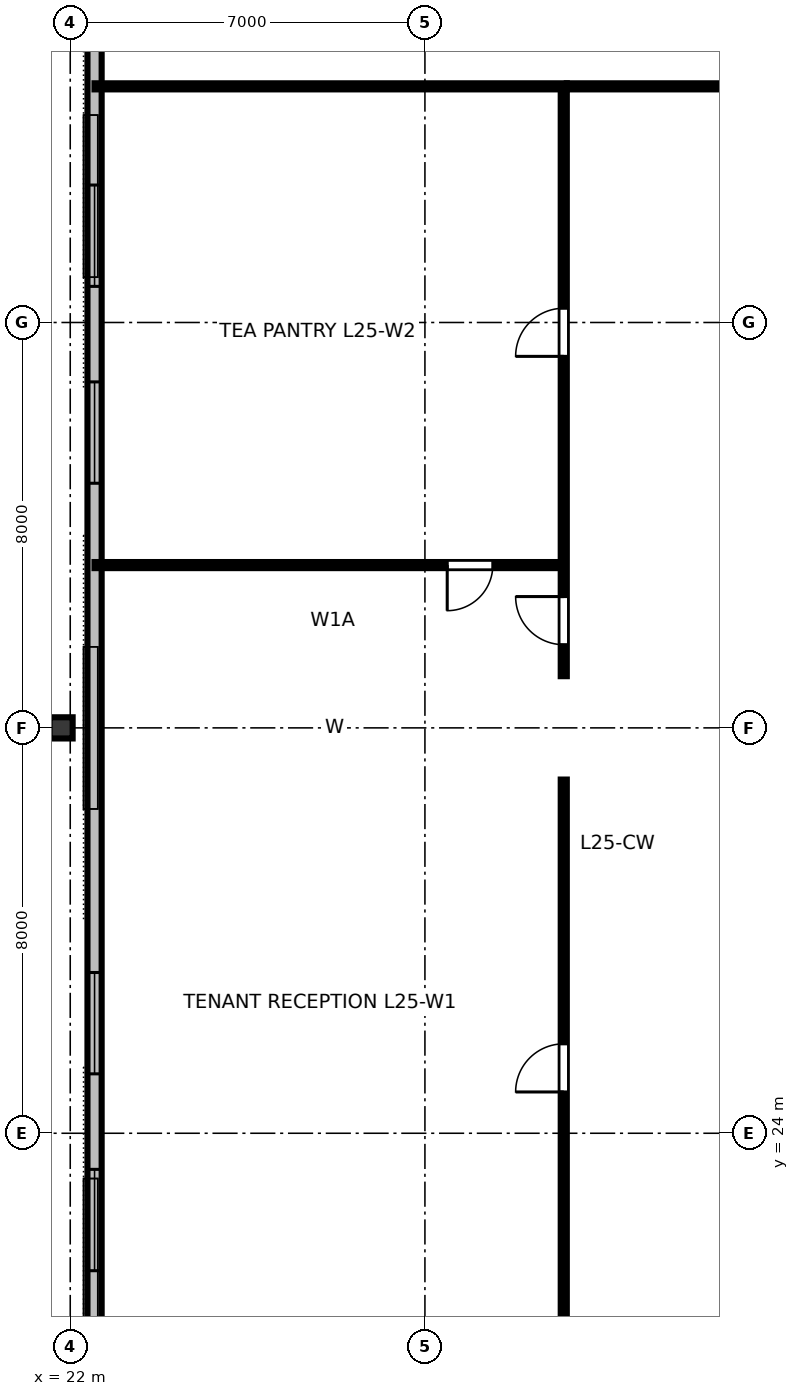
"""IFC4 building model, lengths in metres.
Left out: names, types, materials, properties, quantities, classifications, styles, units other than length and angle.
Written with IfcOpenShell. Run it as: python <this file> out.ifc"""

import sys

from ifc_helpers import new_model, si_unit, direction, frame, frame_2d, origin, origin_2d, place, context, subcontext, project, spatial, rectangle, i_section, extrude, element, fill, save


model = new_model("IFC4")
c1 = context("Model", 3, precision=1e-05, world=origin(), true_north=direction((0.0, 1.0)))
c2 = subcontext(c1, "Body", "Model", "MODEL_VIEW")
j1 = project(units=[si_unit("LENGTHUNIT", "METRE"), si_unit("PLANEANGLEUNIT", "RADIAN")], contexts=[c1])
p1 = place(None, origin())
s1 = spatial("IfcSite", under=j1, at=p1, CompositionType="ELEMENT")
p2 = place(p1, origin())
s2 = spatial("IfcBuilding", under=s1, at=p2, CompositionType="ELEMENT")
p3 = place(p2, frame((0.0, 0.0, 98.8)))
s3 = spatial("IfcBuildingStorey", under=s2, at=p3, CompositionType="ELEMENT", Elevation=98.8)
p4 = place(p3, frame((21.82, 32.0, 0.0), z_axis=(0.0, 0.0, 1.0), x_axis=(0.0, 1.0, 0.0)))
e1 = element("IfcColumn", 1, at=p4, inside=s3, PredefinedType="COLUMN", context=c2, shape_type="SweptSolid", body=[
    extrude(i_section(OverallWidth=0.418, OverallDepth=0.455, WebThickness=0.042, FlangeThickness=0.068, FilletRadius=0.025, at=origin_2d()), origin(), (0.0, 0.0, 1.0), 3.358),
])
p5 = place(p3, frame((22.48, 48.64, 0.0), z_axis=(0.0, 0.0, 1.0), x_axis=(0.0, -1.0, 0.0)))
e2 = element("IfcWall", 2, at=p5, inside=s3, PredefinedType="STANDARD", context=c2, shape_type="SweptSolid", body=[
    extrude(rectangle(XDim=33.28, YDim=0.28, at=frame_2d((16.64, 0.0))), origin(), (0.0, 0.0, 1.0), 3.36),
])
p6 = place(p5, frame((5.927, 0.0, 0.8)))
e3 = element("IfcOpeningElement", 3, at=p6, cuts=e2, PredefinedType="OPENING", context=c2, shape_type="SweptSolid", body=[
    extrude(rectangle(XDim=2.0, YDim=1.95, at=frame_2d((1.0, 0.975))), frame((0.0, 0.15, 0.0), z_axis=(0.0, -1.0, 0.0), x_axis=(1.0, 0.0, 0.0)), (0.0, 0.0, 1.0), 0.3),
])
p7 = place(p5, frame((9.812, 0.0, 0.8)))
e4 = element("IfcOpeningElement", 4, at=p7, cuts=e2, PredefinedType="OPENING", context=c2, shape_type="SweptSolid", body=[
    extrude(rectangle(XDim=2.0, YDim=1.95, at=frame_2d((1.0, 0.975))), frame((0.0, 0.15, 0.0), z_axis=(0.0, -1.0, 0.0), x_axis=(1.0, 0.0, 0.0)), (0.0, 0.0, 1.0), 0.3),
])
p8 = place(p5, frame((21.468, 0.0, 0.8)))
e5 = element("IfcOpeningElement", 5, at=p8, cuts=e2, PredefinedType="OPENING", context=c2, shape_type="SweptSolid", body=[
    extrude(rectangle(XDim=2.0, YDim=1.95, at=frame_2d((1.0, 0.975))), frame((0.0, 0.15, 0.0), z_axis=(0.0, -1.0, 0.0), x_axis=(1.0, 0.0, 0.0)), (0.0, 0.0, 1.0), 0.3),
])
p9 = place(p5, frame((25.353, 0.0, 0.8)))
e6 = element("IfcOpeningElement", 6, at=p9, cuts=e2, PredefinedType="OPENING", context=c2, shape_type="SweptSolid", body=[
    extrude(rectangle(XDim=2.0, YDim=1.95, at=frame_2d((1.0, 0.975))), frame((0.0, 0.15, 0.0), z_axis=(0.0, -1.0, 0.0), x_axis=(1.0, 0.0, 0.0)), (0.0, 0.0, 1.0), 0.3),
])
p10 = place(p3, frame((31.8, 44.66, 0.0), z_axis=(0.0, 0.0, 1.0), x_axis=(1.0, 0.0, 0.0)))
e7 = element("IfcWall", 7, at=p10, inside=s3, PredefinedType="PARTITIONING", context=c2, shape_type="SweptSolid", body=[
    extrude(rectangle(XDim=28.4, YDim=0.12, at=frame_2d((14.2, 0.0))), origin(), (0.0, 0.0, 1.0), 2.64),
])
p11 = place(p10, frame((3.452, 0.0, 0.0)))
e8 = element("IfcOpeningElement", 8, at=p11, cuts=e7, PredefinedType="OPENING", context=c2, shape_type="SweptSolid", body=[
    extrude(rectangle(XDim=0.95, YDim=2.15, at=frame_2d((0.475, 1.075))), frame((0.0, 0.07, 0.0), z_axis=(0.0, -1.0, 0.0), x_axis=(1.0, 0.0, 0.0)), (0.0, 0.0, 1.0), 0.14),
])
p12 = place(p10, frame((12.551, 0.0, 0.0)))
e9 = element("IfcOpeningElement", 9, at=p12, cuts=e7, PredefinedType="OPENING", context=c2, shape_type="SweptSolid", body=[
    extrude(rectangle(XDim=0.95, YDim=2.15, at=frame_2d((0.475, 1.075))), frame((0.0, 0.07, 0.0), z_axis=(0.0, -1.0, 0.0), x_axis=(1.0, 0.0, 0.0)), (0.0, 0.0, 1.0), 0.14),
])
p13 = place(p10, frame((22.823, 0.0, 0.0)))
e10 = element("IfcOpeningElement", 10, at=p13, cuts=e7, PredefinedType="OPENING", context=c2, shape_type="SweptSolid", body=[
    extrude(rectangle(XDim=0.95, YDim=2.15, at=frame_2d((0.475, 1.075))), frame((0.0, 0.07, 0.0), z_axis=(0.0, -1.0, 0.0), x_axis=(1.0, 0.0, 0.0)), (0.0, 0.0, 1.0), 0.14),
])
p14 = place(p3, frame((31.74, 35.213, 0.0), z_axis=(0.0, 0.0, 1.0), x_axis=(-1.0, 0.0, 0.0)))
e11 = element("IfcWall", 11, at=p14, inside=s3, PredefinedType="PARTITIONING", context=c2, shape_type="SweptSolid", body=[
    extrude(rectangle(XDim=9.26, YDim=0.12, at=frame_2d((4.63, 0.0))), origin(), (0.0, 0.0, 1.0), 2.64),
])
p15 = place(p14, frame((1.4, 0.0, 0.0)))
e12 = element("IfcOpeningElement", 12, at=p15, cuts=e11, PredefinedType="OPENING", context=c2, shape_type="SweptSolid", body=[
    extrude(rectangle(XDim=0.9, YDim=2.15, at=frame_2d((0.45, 1.075))), frame((0.0, 0.07, 0.0), z_axis=(0.0, -1.0, 0.0), x_axis=(1.0, 0.0, 0.0)), (0.0, 0.0, 1.0), 0.14),
])
p16 = place(p3, frame((31.74, 19.4, 0.0), z_axis=(0.0, 0.0, 1.0), x_axis=(0.0, 1.0, 0.0)))
e13 = element("IfcWall", 13, at=p16, inside=s3, PredefinedType="PARTITIONING", context=c2, shape_type="SweptSolid", body=[
    extrude(rectangle(XDim=11.58, YDim=0.12, at=frame_2d((5.79, 0.0))), origin(), (0.0, 0.0, 1.0), 2.64),
])
p17 = place(p16, frame((5.415, 0.0, 0.0)))
e14 = element("IfcOpeningElement", 14, at=p17, cuts=e13, PredefinedType="OPENING", context=c2, shape_type="SweptSolid", body=[
    extrude(rectangle(XDim=0.95, YDim=2.15, at=frame_2d((0.475, 1.075))), frame((0.0, 0.07, 0.0), z_axis=(0.0, -1.0, 0.0), x_axis=(1.0, 0.0, 0.0)), (0.0, 0.0, 1.0), 0.14),
])
p18 = place(p3, frame((31.74, 33.02, 0.0), z_axis=(0.0, 0.0, 1.0), x_axis=(0.0, 1.0, 0.0)))
e15 = element("IfcWall", 15, at=p18, inside=s3, PredefinedType="PARTITIONING", context=c2, shape_type="SweptSolid", body=[
    extrude(rectangle(XDim=11.58, YDim=0.12, at=frame_2d((5.79, 0.0))), origin(), (0.0, 0.0, 1.0), 2.64),
])
p19 = place(p18, frame((0.621, 0.0, 0.0)))
e16 = element("IfcOpeningElement", 16, at=p19, cuts=e15, PredefinedType="OPENING", context=c2, shape_type="SweptSolid", body=[
    extrude(rectangle(XDim=0.95, YDim=2.15, at=frame_2d((0.475, 1.075))), frame((0.0, 0.07, 0.0), z_axis=(0.0, -1.0, 0.0), x_axis=(1.0, 0.0, 0.0)), (0.0, 0.0, 1.0), 0.14),
])
p20 = place(p18, frame((6.311, 0.0, 0.0)))
e17 = element("IfcOpeningElement", 17, at=p20, cuts=e15, PredefinedType="OPENING", context=c2, shape_type="SweptSolid", body=[
    extrude(rectangle(XDim=0.95, YDim=2.15, at=frame_2d((0.475, 1.075))), frame((0.0, 0.07, 0.0), z_axis=(0.0, -1.0, 0.0), x_axis=(1.0, 0.0, 0.0)), (0.0, 0.0, 1.0), 0.14),
])
p21 = place(p3, frame((31.8, 44.66, 0.0), z_axis=(0.0, 0.0, 1.0), x_axis=(-1.0, 0.0, 0.0)))
e18 = element("IfcWall", 18, at=p21, inside=s3, PredefinedType="PARTITIONING", context=c2, shape_type="SweptSolid", body=[
    extrude(rectangle(XDim=9.32, YDim=0.12, at=frame_2d((4.66, 0.0))), origin(), (0.0, 0.0, 1.0), 2.64),
])
p22 = place(p6, origin())
e19 = element("IfcWindow", 19, at=p22, inside=s3, PartitioningType="SINGLE_PANEL", PredefinedType="WINDOW", context=c2, shape_type="SweptSolid", body=[
    extrude(rectangle(XDim=2.0, YDim=1.95, at=frame_2d((1.0, 0.975))), frame((0.0, 0.03, 0.0), z_axis=(0.0, -1.0, 0.0), x_axis=(1.0, 0.0, 0.0)), (0.0, 0.0, 1.0), 0.06),
])
fill(e3, e19)
p23 = place(p7, origin())
e20 = element("IfcWindow", 20, at=p23, inside=s3, PartitioningType="SINGLE_PANEL", PredefinedType="WINDOW", context=c2, shape_type="SweptSolid", body=[
    extrude(rectangle(XDim=2.0, YDim=1.95, at=frame_2d((1.0, 0.975))), frame((0.0, 0.03, 0.0), z_axis=(0.0, -1.0, 0.0), x_axis=(1.0, 0.0, 0.0)), (0.0, 0.0, 1.0), 0.06),
])
fill(e4, e20)
p24 = place(p8, origin())
e21 = element("IfcWindow", 21, at=p24, inside=s3, PartitioningType="SINGLE_PANEL", PredefinedType="WINDOW", context=c2, shape_type="SweptSolid", body=[
    extrude(rectangle(XDim=2.0, YDim=1.95, at=frame_2d((1.0, 0.975))), frame((0.0, 0.03, 0.0), z_axis=(0.0, -1.0, 0.0), x_axis=(1.0, 0.0, 0.0)), (0.0, 0.0, 1.0), 0.06),
])
fill(e5, e21)
p25 = place(p9, origin())
e22 = element("IfcWindow", 22, at=p25, inside=s3, PartitioningType="SINGLE_PANEL", PredefinedType="WINDOW", context=c2, shape_type="SweptSolid", body=[
    extrude(rectangle(XDim=2.0, YDim=1.95, at=frame_2d((1.0, 0.975))), frame((0.0, 0.03, 0.0), z_axis=(0.0, -1.0, 0.0), x_axis=(1.0, 0.0, 0.0)), (0.0, 0.0, 1.0), 0.06),
])
fill(e6, e22)
p26 = place(p15, origin())
e23 = element("IfcDoor", 23, at=p26, inside=s3, OperationType="SINGLE_SWING_RIGHT", PredefinedType="DOOR", context=c2, shape_type="SweptSolid", body=[
    extrude(rectangle(XDim=0.9, YDim=2.15, at=frame_2d((0.45, 1.075))), frame((0.0, 0.025, 0.0), z_axis=(0.0, -1.0, 0.0), x_axis=(1.0, 0.0, 0.0)), (0.0, 0.0, 1.0), 0.05),
])
fill(e12, e23)
p27 = place(p17, origin())
e24 = element("IfcDoor", 24, at=p27, inside=s3, OperationType="SINGLE_SWING_LEFT", PredefinedType="DOOR", context=c2, shape_type="SweptSolid", body=[
    extrude(rectangle(XDim=0.95, YDim=2.15, at=frame_2d((0.475, 1.075))), frame((0.0, 0.025, 0.0), z_axis=(0.0, -1.0, 0.0), x_axis=(1.0, 0.0, 0.0)), (0.0, 0.0, 1.0), 0.05),
])
fill(e14, e24)
p28 = place(p19, origin())
e25 = element("IfcDoor", 25, at=p28, inside=s3, OperationType="SINGLE_SWING_RIGHT", PredefinedType="DOOR", context=c2, shape_type="SweptSolid", body=[
    extrude(rectangle(XDim=0.95, YDim=2.15, at=frame_2d((0.475, 1.075))), frame((0.0, 0.025, 0.0), z_axis=(0.0, -1.0, 0.0), x_axis=(1.0, 0.0, 0.0)), (0.0, 0.0, 1.0), 0.05),
])
fill(e16, e25)
p29 = place(p20, origin())
e26 = element("IfcDoor", 26, at=p29, inside=s3, OperationType="SINGLE_SWING_LEFT", PredefinedType="DOOR", context=c2, shape_type="SweptSolid", body=[
    extrude(rectangle(XDim=0.95, YDim=2.15, at=frame_2d((0.475, 1.075))), frame((0.0, 0.025, 0.0), z_axis=(0.0, -1.0, 0.0), x_axis=(1.0, 0.0, 0.0)), (0.0, 0.0, 1.0), 0.05),
])
fill(e17, e26)
save(model, sys.argv[1])
